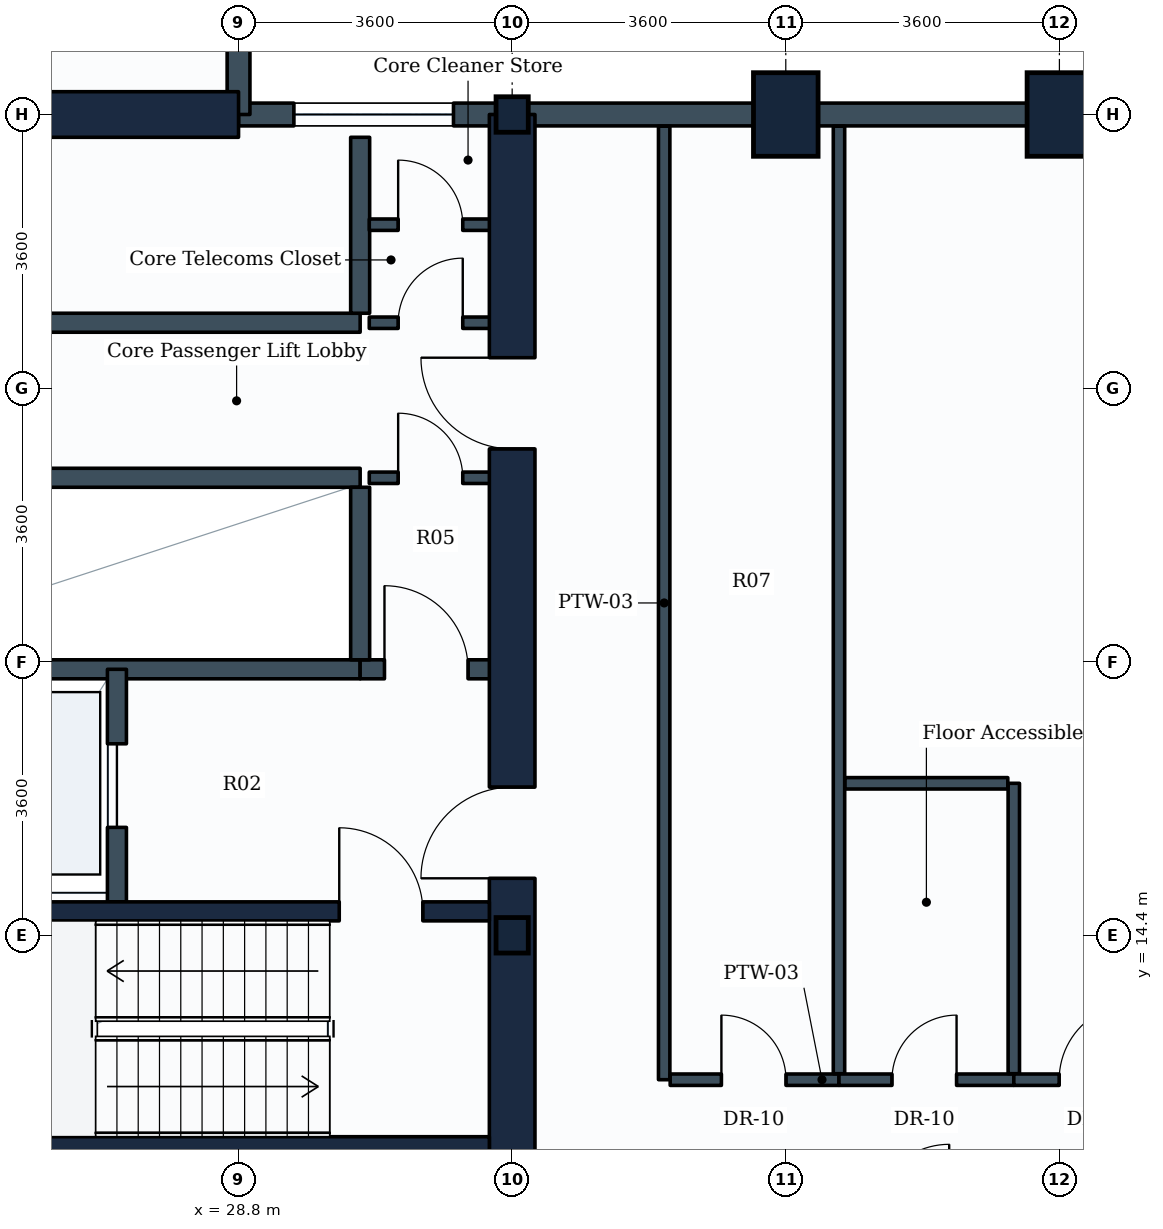
"""IFC4 building model, lengths in metres.
Left out: names, types, materials, properties, quantities, classifications, styles, units other than length and angle.
Written with IfcOpenShell. Run it as: python <this file> out.ifc"""

import sys

from ifc_helpers import new_model, si_unit, direction, frame, frame_2d, origin, origin_2d, place, context, subcontext, project, spatial, rectangle, i_section, extrude, element, fill, save


model = new_model("IFC4")
c1 = context("Model", 3, precision=1e-05, world=origin(), true_north=direction((0.0, 1.0)))
c2 = subcontext(c1, "Body", "Model", "MODEL_VIEW")
j1 = project(units=[si_unit("LENGTHUNIT", "METRE"), si_unit("PLANEANGLEUNIT", "RADIAN")], contexts=[c1])
p1 = place(None, origin())
s1 = spatial("IfcSite", under=j1, at=p1, CompositionType="ELEMENT")
p2 = place(p1, origin())
s2 = spatial("IfcBuilding", under=s1, at=p2, CompositionType="ELEMENT")
p3 = place(p2, frame((0.0, 0.0, 91.8)))
s3 = spatial("IfcBuildingStorey", under=s2, at=p3, CompositionType="ELEMENT", Elevation=91.8)
for number, where, z_axis, x_axis in (
    (1, (32.4, 14.4, 0.0), (0.0, 0.0, 1.0), (1.0, 0.0, 0.0)),
    (2, (32.4, 25.2, 0.0), (0.0, 0.0, 1.0), (1.0, 0.0, 0.0)),
):
    element("IfcColumn", number, at=place(p3, frame(where, z_axis=z_axis, x_axis=x_axis)), inside=s3, PredefinedType="COLUMN", context=c2, shape_type="SweptSolid", body=[
        extrude(i_section(OverallWidth=0.424, OverallDepth=0.467, WebThickness=0.033, FlangeThickness=0.053, FilletRadius=0.015, at=origin_2d()), origin(), (0.0, 0.0, 1.0), 3.9),
    ])
for number, where, z_axis, x_axis in (
    (3, (36.0, 25.2, 0.0), (0.0, 0.0, 1.0), (1.0, 0.0, 0.0)),
    (4, (39.6, 25.2, 0.0), (0.0, 0.0, 1.0), (1.0, 0.0, 0.0)),
):
    element("IfcColumn", number, at=place(p3, frame(where, z_axis=z_axis, x_axis=x_axis)), inside=s3, PredefinedType="COLUMN", context=c2, shape_type="SweptSolid", body=[
        extrude(rectangle(XDim=0.85, YDim=1.1, at=origin_2d()), origin(), (0.0, 0.0, 1.0), 3.9),
    ])
p4 = place(p3, frame((39.6, 25.2, 0.0), z_axis=(0.0, 0.0, 1.0), x_axis=(1.0, 0.0, 0.0)))
e5 = element("IfcWall", 5, at=p4, inside=s3, PredefinedType="STANDARD", context=c2, shape_type="SweptSolid", body=[
    extrude(rectangle(XDim=3.6, YDim=0.3, at=frame_2d((1.8, 0.0))), origin(), (0.0, 0.0, 1.0), 2.93),
])
for number, where, z_axis, x_axis in (
    (6, (36.0, 25.2, 0.0), (0.0, 0.0, 1.0), (1.0, 0.0, 0.0)),
    (7, (32.4, 25.2, 0.0), (0.0, 0.0, 1.0), (1.0, 0.0, 0.0)),
):
    element("IfcWall", number, at=place(p3, frame(where, z_axis=z_axis, x_axis=x_axis)), inside=s3, PredefinedType="STANDARD", context=c2, shape_type="SweptSolid", body=[
        extrude(rectangle(XDim=3.6, YDim=0.3, at=frame_2d((1.8, 0.0))), origin(), (0.0, 0.0, 1.0), 2.93),
    ])
p5 = place(p3, frame((28.8, 25.2, 0.0), z_axis=(0.0, 0.0, 1.0), x_axis=(1.0, 0.0, 0.0)))
e8 = element("IfcWall", 8, at=p5, inside=s3, PredefinedType="STANDARD", context=c2, shape_type="SweptSolid", body=[
    extrude(rectangle(XDim=3.6, YDim=0.3, at=frame_2d((1.8, 0.0))), origin(), (0.0, 0.0, 1.0), 3.635),
])
p6 = place(p5, frame((0.728, 0.0, 0.85)))
e9 = element("IfcOpeningElement", 9, at=p6, cuts=e8, PredefinedType="OPENING", context=c2, shape_type="SweptSolid", body=[
    extrude(rectangle(XDim=2.1, YDim=1.35, at=frame_2d((1.05, 0.675))), frame((0.0, 0.16, 0.0), z_axis=(0.0, -1.0, 0.0), x_axis=(1.0, 0.0, 0.0)), (0.0, 0.0, 1.0), 0.32),
])
p7 = place(p3, frame((28.8, 28.8, 0.0), z_axis=(0.0, 0.0, 1.0), x_axis=(0.0, -1.0, 0.0)))
e10 = element("IfcWall", 10, at=p7, inside=s3, PredefinedType="STANDARD", context=c2, shape_type="SweptSolid", body=[
    extrude(rectangle(XDim=3.6, YDim=0.3, at=frame_2d((1.8, 0.0))), origin(), (0.0, 0.0, 1.0), 3.19),
])
p8 = place(p3, frame((14.4, 25.2, 0.0), z_axis=(0.0, 0.0, 1.0), x_axis=(1.0, 0.0, 0.0)))
e11 = element("IfcWall", 11, at=p8, inside=s3, PredefinedType="SHEAR", context=c2, shape_type="SweptSolid", body=[
    extrude(rectangle(XDim=14.4, YDim=0.6, at=frame_2d((7.2, 0.0))), origin(), (0.0, 0.0, 1.0), 3.65),
])
p9 = place(p3, frame((32.4, 10.8, 0.0), z_axis=(0.0, 0.0, 1.0), x_axis=(0.0, 1.0, 0.0)))
e12 = element("IfcWall", 12, at=p9, inside=s3, PredefinedType="SHEAR", context=c2, shape_type="SweptSolid", body=[
    extrude(rectangle(XDim=14.4, YDim=0.6, at=frame_2d((7.2, 0.0))), origin(), (0.0, 0.0, 1.0), 3.65),
])
p10 = place(p9, frame((4.35, 0.0, 0.0)))
e13 = element("IfcOpeningElement", 13, at=p10, cuts=e12, PredefinedType="OPENING", context=c2, shape_type="SweptSolid", body=[
    extrude(rectangle(XDim=1.2, YDim=2.1, at=frame_2d((0.6, 1.05))), frame((0.0, 0.31, 0.0), z_axis=(0.0, -1.0, 0.0), x_axis=(1.0, 0.0, 0.0)), (0.0, 0.0, 1.0), 0.62),
])
p11 = place(p9, frame((10.0, 0.0, 0.0)))
e14 = element("IfcOpeningElement", 14, at=p11, cuts=e12, PredefinedType="OPENING", context=c2, shape_type="SweptSolid", body=[
    extrude(rectangle(XDim=1.2, YDim=2.1, at=frame_2d((0.6, 1.05))), frame((0.0, 0.31, 0.0), z_axis=(0.0, -1.0, 0.0), x_axis=(1.0, 0.0, 0.0)), (0.0, 0.0, 1.0), 0.62),
])
p12 = place(p3, frame((23.35, 11.625, 0.0), z_axis=(0.0, 0.0, 1.0), x_axis=(1.0, 0.0, 0.0)))
e15 = element("IfcWall", 15, at=p12, inside=s3, PredefinedType="SHEAR", context=c2, shape_type="SweptSolid", body=[
    extrude(rectangle(XDim=8.75, YDim=0.25, at=frame_2d((4.375, 0.0))), origin(), (0.0, 0.0, 1.0), 3.65),
])
p13 = place(p3, frame((23.35, 14.715, 0.0), z_axis=(0.0, 0.0, 1.0), x_axis=(1.0, 0.0, 0.0)))
e16 = element("IfcWall", 16, at=p13, inside=s3, PredefinedType="SHEAR", context=c2, shape_type="SweptSolid", body=[
    extrude(rectangle(XDim=8.75, YDim=0.25, at=frame_2d((4.375, 0.0))), origin(), (0.0, 0.0, 1.0), 3.65),
])
p14 = place(p13, frame((6.775, 0.0, 0.0)))
e17 = element("IfcOpeningElement", 17, at=p14, cuts=e16, PredefinedType="OPENING", context=c2, shape_type="SweptSolid", body=[
    extrude(rectangle(XDim=1.1, YDim=2.1, at=frame_2d((0.55, 1.05))), frame((0.0, 0.135, 0.0), z_axis=(0.0, -1.0, 0.0), x_axis=(1.0, 0.0, 0.0)), (0.0, 0.0, 1.0), 0.27),
])
p15 = place(p3, frame((21.88, 17.9, 0.0), z_axis=(0.0, 0.0, 1.0), x_axis=(1.0, 0.0, 0.0)))
e18 = element("IfcWall", 18, at=p15, inside=s3, PredefinedType="PARTITIONING", context=c2, shape_type="SweptSolid", body=[
    extrude(rectangle(XDim=8.52, YDim=0.25, at=frame_2d((4.26, 0.0))), origin(), (0.0, 0.0, 1.0), 3.635),
])
p16 = place(p3, frame((30.4, 17.9, 0.0), z_axis=(0.0, 0.0, 1.0), x_axis=(1.0, 0.0, 0.0)))
e19 = element("IfcWall", 19, at=p16, inside=s3, PredefinedType="PARTITIONING", context=c2, shape_type="SweptSolid", body=[
    extrude(rectangle(XDim=1.75, YDim=0.25, at=frame_2d((0.875, 0.0))), origin(), (0.0, 0.0, 1.0), 3.635),
])
p17 = place(p16, frame((0.32, 0.0, 0.0)))
e20 = element("IfcOpeningElement", 20, at=p17, cuts=e19, PredefinedType="OPENING", context=c2, shape_type="SweptSolid", body=[
    extrude(rectangle(XDim=1.1, YDim=2.1, at=frame_2d((0.55, 1.05))), frame((0.0, 0.135, 0.0), z_axis=(0.0, -1.0, 0.0), x_axis=(1.0, 0.0, 0.0)), (0.0, 0.0, 1.0), 0.27),
])
p18 = place(p3, frame((27.2, 14.84, 0.0), z_axis=(0.0, 0.0, 1.0), x_axis=(0.0, 1.0, 0.0)))
e21 = element("IfcWall", 21, at=p18, inside=s3, PredefinedType="PARTITIONING", context=c2, shape_type="SweptSolid", body=[
    extrude(rectangle(XDim=3.06, YDim=0.25, at=frame_2d((1.53, 0.0))), origin(), (0.0, 0.0, 1.0), 3.635),
])
p19 = place(p18, frame((0.98, 0.0, 0.0)))
e22 = element("IfcOpeningElement", 22, at=p19, cuts=e21, PredefinedType="OPENING", context=c2, shape_type="SweptSolid", body=[
    extrude(rectangle(XDim=1.1, YDim=2.1, at=frame_2d((0.55, 1.05))), frame((0.0, 0.135, 0.0), z_axis=(0.0, -1.0, 0.0), x_axis=(1.0, 0.0, 0.0)), (0.0, 0.0, 1.0), 0.27),
])
p20 = place(p3, frame((23.18, 20.42, 0.0), z_axis=(0.0, 0.0, 1.0), x_axis=(1.0, 0.0, 0.0)))
e23 = element("IfcWall", 23, at=p20, inside=s3, PredefinedType="PARTITIONING", context=c2, shape_type="SweptSolid", body=[
    extrude(rectangle(XDim=7.22, YDim=0.25, at=frame_2d((3.61, 0.0))), origin(), (0.0, 0.0, 1.0), 3.635),
])
p21 = place(p3, frame((30.4, 18.025, 0.0), z_axis=(0.0, 0.0, 1.0), x_axis=(0.0, 1.0, 0.0)))
e24 = element("IfcWall", 24, at=p21, inside=s3, PredefinedType="PARTITIONING", context=c2, shape_type="SweptSolid", body=[
    extrude(rectangle(XDim=2.27, YDim=0.25, at=frame_2d((1.135, 0.0))), origin(), (0.0, 0.0, 1.0), 3.635),
])
p22 = place(p3, frame((23.18, 22.46, 0.0), z_axis=(0.0, 0.0, 1.0), x_axis=(1.0, 0.0, 0.0)))
e25 = element("IfcWall", 25, at=p22, inside=s3, PredefinedType="PARTITIONING", context=c2, shape_type="SweptSolid", body=[
    extrude(rectangle(XDim=7.22, YDim=0.25, at=frame_2d((3.61, 0.0))), origin(), (0.0, 0.0, 1.0), 3.635),
])
p23 = place(p3, frame((30.4, 22.585, 0.0), z_axis=(0.0, 0.0, 1.0), x_axis=(0.0, 1.0, 0.0)))
e26 = element("IfcWall", 26, at=p23, inside=s3, PredefinedType="PARTITIONING", context=c2, shape_type="SweptSolid", body=[
    extrude(rectangle(XDim=2.315, YDim=0.25, at=frame_2d((1.157, 0.0))), origin(), (0.0, 0.0, 1.0), 3.635),
])
p24 = place(p3, frame((30.52, 22.46, 0.0), z_axis=(0.0, 0.0, 1.0), x_axis=(1.0, 0.0, 0.0)))
e27 = element("IfcWall", 27, at=p24, inside=s3, PredefinedType="PARTITIONING", context=c2, shape_type="SweptSolid", body=[
    extrude(rectangle(XDim=1.63, YDim=0.15, at=frame_2d((0.815, 0.0))), origin(), (0.0, 0.0, 1.0), 3.635),
])
p25 = place(p24, frame((0.38, 0.0, 0.0)))
e28 = element("IfcOpeningElement", 28, at=p25, cuts=e27, PredefinedType="OPENING", context=c2, shape_type="SweptSolid", body=[
    extrude(rectangle(XDim=0.85, YDim=2.1, at=frame_2d((0.425, 1.05))), frame((0.0, 0.085, 0.0), z_axis=(0.0, -1.0, 0.0), x_axis=(1.0, 0.0, 0.0)), (0.0, 0.0, 1.0), 0.17),
])
p26 = place(p3, frame((30.52, 23.75, 0.0), z_axis=(0.0, 0.0, 1.0), x_axis=(1.0, 0.0, 0.0)))
e29 = element("IfcWall", 29, at=p26, inside=s3, PredefinedType="PARTITIONING", context=c2, shape_type="SweptSolid", body=[
    extrude(rectangle(XDim=1.63, YDim=0.15, at=frame_2d((0.815, 0.0))), origin(), (0.0, 0.0, 1.0), 3.635),
])
p27 = place(p26, frame((0.38, 0.0, 0.0)))
e30 = element("IfcOpeningElement", 30, at=p27, cuts=e29, PredefinedType="OPENING", context=c2, shape_type="SweptSolid", body=[
    extrude(rectangle(XDim=0.85, YDim=2.1, at=frame_2d((0.425, 1.05))), frame((0.0, 0.085, 0.0), z_axis=(0.0, -1.0, 0.0), x_axis=(1.0, 0.0, 0.0)), (0.0, 0.0, 1.0), 0.17),
])
p28 = place(p3, frame((30.52, 20.42, 0.0), z_axis=(0.0, 0.0, 1.0), x_axis=(1.0, 0.0, 0.0)))
e31 = element("IfcWall", 31, at=p28, inside=s3, PredefinedType="PARTITIONING", context=c2, shape_type="SweptSolid", body=[
    extrude(rectangle(XDim=1.63, YDim=0.15, at=frame_2d((0.815, 0.0))), origin(), (0.0, 0.0, 1.0), 3.635),
])
p29 = place(p28, frame((0.38, 0.0, 0.0)))
e32 = element("IfcOpeningElement", 32, at=p29, cuts=e31, PredefinedType="OPENING", context=c2, shape_type="SweptSolid", body=[
    extrude(rectangle(XDim=0.85, YDim=2.1, at=frame_2d((0.425, 1.05))), frame((0.0, 0.085, 0.0), z_axis=(0.0, -1.0, 0.0), x_axis=(1.0, 0.0, 0.0)), (0.0, 0.0, 1.0), 0.17),
])
p30 = place(p3, frame((34.4, 12.5, 0.0), z_axis=(0.0, 0.0, 1.0), x_axis=(0.0, 1.0, 0.0)))
e33 = element("IfcWall", 33, at=p30, inside=s3, PredefinedType="PARTITIONING", context=c2, shape_type="SweptSolid", body=[
    extrude(rectangle(XDim=12.546, YDim=0.15, at=frame_2d((6.273, 0.0))), origin(), (0.0, 0.0, 1.0), 2.93),
])
p31 = place(p3, frame((34.479, 12.5, 0.0), z_axis=(0.0, 0.0, 1.0), x_axis=(1.0, 0.0, 0.0)))
e34 = element("IfcWall", 34, at=p31, inside=s3, PredefinedType="PARTITIONING", context=c2, shape_type="SweptSolid", body=[
    extrude(rectangle(XDim=2.221, YDim=0.15, at=frame_2d((1.11, 0.0))), origin(), (0.0, 0.0, 1.0), 3.18),
])
p32 = place(p31, frame((0.674, 0.0, 0.0)))
e35 = element("IfcOpeningElement", 35, at=p32, cuts=e34, PredefinedType="OPENING", context=c2, shape_type="SweptSolid", body=[
    extrude(rectangle(XDim=0.85, YDim=2.1, at=frame_2d((0.425, 1.05))), frame((0.0, 0.085, 0.0), z_axis=(0.0, -1.0, 0.0), x_axis=(1.0, 0.0, 0.0)), (0.0, 0.0, 1.0), 0.17),
])
p33 = place(p3, frame((36.7, 12.579, 0.0), z_axis=(0.0, 0.0, 1.0), x_axis=(0.0, 1.0, 0.0)))
e36 = element("IfcWall", 36, at=p33, inside=s3, PredefinedType="PARTITIONING", context=c2, shape_type="SweptSolid", body=[
    extrude(rectangle(XDim=12.467, YDim=0.15, at=frame_2d((6.233, 0.0))), origin(), (0.0, 0.0, 1.0), 2.93),
])
p34 = place(p3, frame((36.7, 12.5, 0.0), z_axis=(0.0, 0.0, 1.0), x_axis=(1.0, 0.0, 0.0)))
e37 = element("IfcWall", 37, at=p34, inside=s3, PredefinedType="PARTITIONING", context=c2, shape_type="SweptSolid", body=[
    extrude(rectangle(XDim=2.3, YDim=0.15, at=frame_2d((1.15, 0.0))), origin(), (0.0, 0.0, 1.0), 3.635),
])
p35 = place(p34, frame((0.697, 0.0, 0.0)))
e38 = element("IfcOpeningElement", 38, at=p35, cuts=e37, PredefinedType="OPENING", context=c2, shape_type="SweptSolid", body=[
    extrude(rectangle(XDim=0.85, YDim=2.1, at=frame_2d((0.425, 1.05))), frame((0.0, 0.085, 0.0), z_axis=(0.0, -1.0, 0.0), x_axis=(1.0, 0.0, 0.0)), (0.0, 0.0, 1.0), 0.17),
])
p36 = place(p3, frame((39.0, 12.579, 0.0), z_axis=(0.0, 0.0, 1.0), x_axis=(0.0, 1.0, 0.0)))
e39 = element("IfcWall", 39, at=p36, inside=s3, PredefinedType="PARTITIONING", context=c2, shape_type="SweptSolid", body=[
    extrude(rectangle(XDim=3.821, YDim=0.15, at=frame_2d((1.91, 0.0))), origin(), (0.0, 0.0, 1.0), 3.18),
])
p37 = place(p3, frame((36.779, 16.4, 0.0), z_axis=(0.0, 0.0, 1.0), x_axis=(1.0, 0.0, 0.0)))
e40 = element("IfcWall", 40, at=p37, inside=s3, PredefinedType="PARTITIONING", context=c2, shape_type="SweptSolid", body=[
    extrude(rectangle(XDim=2.142, YDim=0.15, at=frame_2d((1.071, 0.0))), origin(), (0.0, 0.0, 1.0), 3.635),
])
p38 = place(p3, frame((39.0, 12.5, 0.0), z_axis=(0.0, 0.0, 1.0), x_axis=(1.0, 0.0, 0.0)))
e41 = element("IfcWall", 41, at=p38, inside=s3, PredefinedType="PARTITIONING", context=c2, shape_type="SweptSolid", body=[
    extrude(rectangle(XDim=8.291, YDim=0.15, at=frame_2d((4.146, 0.0))), origin(), (0.0, 0.0, 1.0), 3.19),
])
p39 = place(p38, frame((0.597, 0.0, 0.0)))
e42 = element("IfcOpeningElement", 42, at=p39, cuts=e41, PredefinedType="OPENING", context=c2, shape_type="SweptSolid", body=[
    extrude(rectangle(XDim=1.0, YDim=2.1, at=frame_2d((0.5, 1.05))), frame((0.0, 0.085, 0.0), z_axis=(0.0, -1.0, 0.0), x_axis=(1.0, 0.0, 0.0)), (0.0, 0.0, 1.0), 0.17),
])
p40 = place(p6, origin())
e43 = element("IfcWindow", 43, at=p40, inside=s3, PartitioningType="SINGLE_PANEL", PredefinedType="WINDOW", context=c2, shape_type="SweptSolid", body=[
    extrude(rectangle(XDim=2.1, YDim=1.35, at=frame_2d((1.05, 0.675))), frame((0.0, 0.03, 0.0), z_axis=(0.0, -1.0, 0.0), x_axis=(1.0, 0.0, 0.0)), (0.0, 0.0, 1.0), 0.06),
])
fill(e9, e43)
p41 = place(p14, origin())
e44 = element("IfcDoor", 44, at=p41, inside=s3, OperationType="SINGLE_SWING_LEFT", PredefinedType="DOOR", context=c2, shape_type="SweptSolid", body=[
    extrude(rectangle(XDim=1.1, YDim=2.1, at=frame_2d((0.55, 1.05))), frame((0.0, 0.025, 0.0), z_axis=(0.0, -1.0, 0.0), x_axis=(1.0, 0.0, 0.0)), (0.0, 0.0, 1.0), 0.05),
])
fill(e17, e44)
p42 = place(p19, origin())
e45 = element("IfcDoor", 45, at=p42, inside=s3, OperationType="SLIDING_TO_LEFT", PredefinedType="DOOR", context=c2, shape_type="SweptSolid", body=[
    extrude(rectangle(XDim=1.1, YDim=2.1, at=frame_2d((0.55, 1.05))), frame((0.0, 0.025, 0.0), z_axis=(0.0, -1.0, 0.0), x_axis=(1.0, 0.0, 0.0)), (0.0, 0.0, 1.0), 0.05),
])
fill(e22, e45)
p43 = place(p10, origin())
e46 = element("IfcDoor", 46, at=p43, inside=s3, OperationType="SINGLE_SWING_LEFT", PredefinedType="DOOR", context=c2, shape_type="SweptSolid", body=[
    extrude(rectangle(XDim=1.2, YDim=2.1, at=frame_2d((0.6, 1.05))), frame((0.0, 0.025, 0.0), z_axis=(0.0, -1.0, 0.0), x_axis=(1.0, 0.0, 0.0)), (0.0, 0.0, 1.0), 0.05),
])
fill(e13, e46)
p44 = place(p17, origin())
e47 = element("IfcDoor", 47, at=p44, inside=s3, OperationType="SINGLE_SWING_LEFT", PredefinedType="DOOR", context=c2, shape_type="SweptSolid", body=[
    extrude(rectangle(XDim=1.1, YDim=2.1, at=frame_2d((0.55, 1.05))), frame((0.0, 0.025, 0.0), z_axis=(0.0, -1.0, 0.0), x_axis=(1.0, 0.0, 0.0)), (0.0, 0.0, 1.0), 0.05),
])
fill(e20, e47)
p45 = place(p11, origin())
e48 = element("IfcDoor", 48, at=p45, inside=s3, OperationType="SINGLE_SWING_RIGHT", PredefinedType="DOOR", context=c2, shape_type="SweptSolid", body=[
    extrude(rectangle(XDim=1.2, YDim=2.1, at=frame_2d((0.6, 1.05))), frame((0.0, 0.025, 0.0), z_axis=(0.0, -1.0, 0.0), x_axis=(1.0, 0.0, 0.0)), (0.0, 0.0, 1.0), 0.05),
])
fill(e14, e48)
p46 = place(p25, origin())
e49 = element("IfcDoor", 49, at=p46, inside=s3, OperationType="SINGLE_SWING_RIGHT", PredefinedType="DOOR", context=c2, shape_type="SweptSolid", body=[
    extrude(rectangle(XDim=0.85, YDim=2.1, at=frame_2d((0.425, 1.05))), frame((0.0, 0.025, 0.0), z_axis=(0.0, -1.0, 0.0), x_axis=(1.0, 0.0, 0.0)), (0.0, 0.0, 1.0), 0.05),
])
fill(e28, e49)
p47 = place(p27, origin())
e50 = element("IfcDoor", 50, at=p47, inside=s3, OperationType="SINGLE_SWING_LEFT", PredefinedType="DOOR", context=c2, shape_type="SweptSolid", body=[
    extrude(rectangle(XDim=0.85, YDim=2.1, at=frame_2d((0.425, 1.05))), frame((0.0, 0.025, 0.0), z_axis=(0.0, -1.0, 0.0), x_axis=(1.0, 0.0, 0.0)), (0.0, 0.0, 1.0), 0.05),
])
fill(e30, e50)
p48 = place(p29, origin())
e51 = element("IfcDoor", 51, at=p48, inside=s3, OperationType="SINGLE_SWING_LEFT", PredefinedType="DOOR", context=c2, shape_type="SweptSolid", body=[
    extrude(rectangle(XDim=0.85, YDim=2.1, at=frame_2d((0.425, 1.05))), frame((0.0, 0.025, 0.0), z_axis=(0.0, -1.0, 0.0), x_axis=(1.0, 0.0, 0.0)), (0.0, 0.0, 1.0), 0.05),
])
fill(e32, e51)
p49 = place(p32, origin())
e52 = element("IfcDoor", 52, at=p49, inside=s3, OperationType="SINGLE_SWING_LEFT", PredefinedType="DOOR", context=c2, shape_type="SweptSolid", body=[
    extrude(rectangle(XDim=0.85, YDim=2.1, at=frame_2d((0.425, 1.05))), frame((0.0, 0.025, 0.0), z_axis=(0.0, -1.0, 0.0), x_axis=(1.0, 0.0, 0.0)), (0.0, 0.0, 1.0), 0.05),
])
fill(e35, e52)
p50 = place(p35, origin())
e53 = element("IfcDoor", 53, at=p50, inside=s3, OperationType="SINGLE_SWING_RIGHT", PredefinedType="DOOR", context=c2, shape_type="SweptSolid", body=[
    extrude(rectangle(XDim=0.85, YDim=2.1, at=frame_2d((0.425, 1.05))), frame((0.0, 0.025, 0.0), z_axis=(0.0, -1.0, 0.0), x_axis=(1.0, 0.0, 0.0)), (0.0, 0.0, 1.0), 0.05),
])
fill(e38, e53)
p51 = place(p39, origin())
e54 = element("IfcDoor", 54, at=p51, inside=s3, OperationType="SINGLE_SWING_RIGHT", PredefinedType="DOOR", context=c2, shape_type="SweptSolid", body=[
    extrude(rectangle(XDim=1.0, YDim=2.1, at=frame_2d((0.5, 1.05))), frame((0.0, 0.025, 0.0), z_axis=(0.0, -1.0, 0.0), x_axis=(1.0, 0.0, 0.0)), (0.0, 0.0, 1.0), 0.05),
])
fill(e42, e54)
save(model, sys.argv[1])
